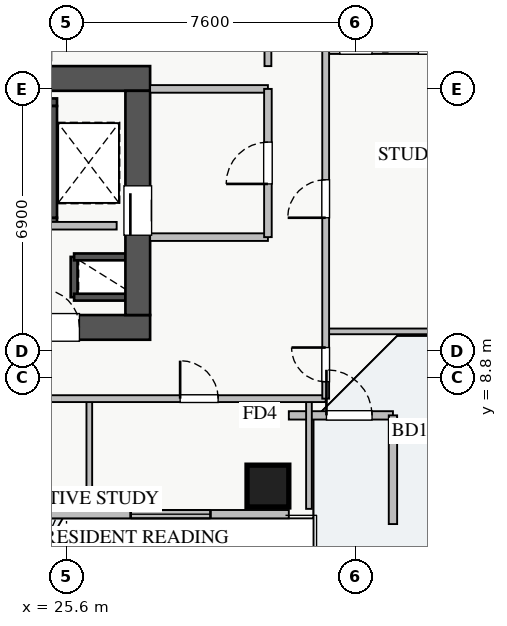
"""IFC4 building model, lengths in metres.
Left out: names, types, materials, properties, quantities, classifications, styles, units other than length and angle.
Written with IfcOpenShell. Run it as: python <this file> out.ifc"""

import sys

from ifc_helpers import new_model, si_unit, direction, frame, frame_2d, origin, origin_2d, place, context, subcontext, project, spatial, rectangle, extrude, source, transform, mapped, element, fill, save


model = new_model("IFC4")
c1 = context("Model", 3, precision=1e-05, world=origin(), true_north=direction((0.0, 1.0)))
c2 = subcontext(c1, "Body", "Model", "MODEL_VIEW")
j1 = project(units=[si_unit("LENGTHUNIT", "METRE"), si_unit("PLANEANGLEUNIT", "RADIAN")], contexts=[c1])
p1 = place(None, origin())
s1 = spatial("IfcSite", under=j1, at=p1, CompositionType="ELEMENT")
p2 = place(p1, origin())
s2 = spatial("IfcBuilding", under=s1, at=p2, CompositionType="ELEMENT")
p3 = place(p2, frame((0.0, 0.0, 113.25)))
s3 = spatial("IfcBuildingStorey", under=s2, at=p3, CompositionType="ELEMENT", Elevation=113.25)
p4 = place(p3, frame((25.8, 10.92, 0.0), z_axis=(0.0, 0.0, 1.0), x_axis=(0.0, 1.0, 0.0)))
e1 = element("IfcWall", 1, at=p4, inside=s3, PredefinedType="SHEAR", context=c2, shape_type="SweptSolid", body=[
    extrude(rectangle(XDim=1.06, YDim=0.18, at=frame_2d((0.53, 0.0))), origin(), (0.0, 0.0, 1.0), 3.07),
])
for number, where, z_axis, x_axis in (
    (2, (25.8, 11.98, 0.0), (0.0, 0.0, 1.0), (1.0, 0.0, 0.0)),
    (3, (25.8, 10.92, 0.0), (0.0, 0.0, 1.0), (1.0, 0.0, 0.0)),
):
    element("IfcWall", number, at=place(p3, frame(where, z_axis=z_axis, x_axis=x_axis)), inside=s3, PredefinedType="SHEAR", context=c2, shape_type="SweptSolid", body=[
        extrude(rectangle(XDim=1.35, YDim=0.18, at=frame_2d((0.675, 0.0))), origin(), (0.0, 0.0, 1.0), 3.07),
    ])
p5 = place(p3, frame((18.2, 12.91, 0.0), z_axis=(0.0, 0.0, 1.0), x_axis=(1.0, 0.0, 0.0)))
e4 = element("IfcWall", 4, at=p5, inside=s3, PredefinedType="SHEAR", context=c2, shape_type="SweptSolid", body=[
    extrude(rectangle(XDim=7.15, YDim=0.2, at=frame_2d((3.575, 0.0))), origin(), (0.0, 0.0, 1.0), 3.25),
])
p6 = place(p5, frame((0.35, 0.0, 0.0)))
e5 = element("IfcOpeningElement", 5, at=p6, cuts=e4, PredefinedType="OPENING", context=c2, shape_type="SweptSolid", body=[
    extrude(rectangle(XDim=1.1, YDim=2.05, at=frame_2d((0.55, 1.025))), frame((0.0, 0.11, 0.0), z_axis=(0.0, -1.0, 0.0), x_axis=(1.0, 0.0, 0.0)), (0.0, 0.0, 1.0), 0.22),
])
p7 = place(p3, frame((18.2, 16.05, 0.0), z_axis=(0.0, 0.0, 1.0), x_axis=(1.0, 0.0, 0.0)))
e6 = element("IfcWall", 6, at=p7, inside=s3, PredefinedType="SHEAR", context=c2, shape_type="SweptSolid", body=[
    extrude(rectangle(XDim=7.15, YDim=0.2, at=frame_2d((3.575, 0.0))), origin(), (0.0, 0.0, 1.0), 3.25),
])
p8 = place(p3, frame((25.25, 13.01, 0.0), z_axis=(0.0, 0.0, 1.0), x_axis=(0.0, 1.0, 0.0)))
e7 = element("IfcWall", 7, at=p8, inside=s3, PredefinedType="SHEAR", context=c2, shape_type="SweptSolid", body=[
    extrude(rectangle(XDim=2.94, YDim=0.2, at=frame_2d((1.47, 0.0))), origin(), (0.0, 0.0, 1.0), 3.25),
])
p9 = place(p3, frame((10.2, 10.125, 0.0), z_axis=(0.0, 0.0, 1.0), x_axis=(1.0, 0.0, 0.0)))
e8 = element("IfcWall", 8, at=p9, inside=s3, PredefinedType="SHEAR", context=c2, shape_type="SweptSolid", body=[
    extrude(rectangle(XDim=17.6, YDim=0.65, at=frame_2d((8.8, 0.0))), origin(), (0.0, 0.0, 1.0), 3.25),
])
p10 = place(p9, frame((1.15, 0.0, 0.0)))
e9 = element("IfcOpeningElement", 9, at=p10, cuts=e8, PredefinedType="OPENING", context=c2, shape_type="SweptSolid", body=[
    extrude(rectangle(XDim=1.1, YDim=2.05, at=frame_2d((0.55, 1.025))), frame((0.0, 0.335, 0.0), z_axis=(0.0, -1.0, 0.0), x_axis=(1.0, 0.0, 0.0)), (0.0, 0.0, 1.0), 0.67),
])
p11 = place(p9, frame((8.3, 0.0, 0.0)))
e10 = element("IfcOpeningElement", 10, at=p11, cuts=e8, PredefinedType="OPENING", context=c2, shape_type="SweptSolid", body=[
    extrude(rectangle(XDim=1.1, YDim=2.05, at=frame_2d((0.55, 1.025))), frame((0.0, 0.335, 0.0), z_axis=(0.0, -1.0, 0.0), x_axis=(1.0, 0.0, 0.0)), (0.0, 0.0, 1.0), 0.67),
])
p12 = place(p9, frame((4.9, 0.0, 0.0)))
e11 = element("IfcOpeningElement", 11, at=p12, cuts=e8, PredefinedType="OPENING", context=c2, shape_type="SweptSolid", body=[
    extrude(rectangle(XDim=1.1, YDim=2.05, at=frame_2d((0.55, 1.025))), frame((0.0, 0.335, 0.0), z_axis=(0.0, -1.0, 0.0), x_axis=(1.0, 0.0, 0.0)), (0.0, 0.0, 1.0), 0.67),
])
p13 = place(p9, frame((14.74, 0.0, 0.0)))
e12 = element("IfcOpeningElement", 12, at=p13, cuts=e8, PredefinedType="OPENING", context=c2, shape_type="SweptSolid", body=[
    extrude(rectangle(XDim=1.0, YDim=2.05, at=frame_2d((0.5, 1.025))), frame((0.0, 0.335, 0.0), z_axis=(0.0, -1.0, 0.0), x_axis=(1.0, 0.0, 0.0)), (0.0, 0.0, 1.0), 0.67),
])
p14 = place(p9, frame((10.155, 0.0, 0.0)))
e13 = element("IfcOpeningElement", 13, at=p14, cuts=e8, PredefinedType="OPENING", context=c2, shape_type="SweptSolid", body=[
    extrude(rectangle(XDim=1.0, YDim=2.05, at=frame_2d((0.5, 1.025))), frame((0.0, 0.335, 0.0), z_axis=(0.0, -1.0, 0.0), x_axis=(1.0, 0.0, 0.0)), (0.0, 0.0, 1.0), 0.67),
])
p15 = place(p9, frame((11.87, 0.0, 0.0)))
e14 = element("IfcOpeningElement", 14, at=p15, cuts=e8, PredefinedType="OPENING", context=c2, shape_type="SweptSolid", body=[
    extrude(rectangle(XDim=1.0, YDim=2.05, at=frame_2d((0.5, 1.025))), frame((0.0, 0.335, 0.0), z_axis=(0.0, -1.0, 0.0), x_axis=(1.0, 0.0, 0.0)), (0.0, 0.0, 1.0), 0.67),
])
p16 = place(p9, frame((13.46, 0.0, 0.0)))
e15 = element("IfcOpeningElement", 15, at=p16, cuts=e8, PredefinedType="OPENING", context=c2, shape_type="SweptSolid", body=[
    extrude(rectangle(XDim=1.0, YDim=2.05, at=frame_2d((0.5, 1.025))), frame((0.0, 0.335, 0.0), z_axis=(0.0, -1.0, 0.0), x_axis=(1.0, 0.0, 0.0)), (0.0, 0.0, 1.0), 0.67),
])
p17 = place(p3, frame((10.2, 16.675, 0.0), z_axis=(0.0, 0.0, 1.0), x_axis=(1.0, 0.0, 0.0)))
e16 = element("IfcWall", 16, at=p17, inside=s3, PredefinedType="SHEAR", context=c2, shape_type="SweptSolid", body=[
    extrude(rectangle(XDim=17.6, YDim=0.65, at=frame_2d((8.8, 0.0))), origin(), (0.0, 0.0, 1.0), 3.25),
])
p18 = place(p3, frame((27.475, 10.45, 0.0), z_axis=(0.0, 0.0, 1.0), x_axis=(0.0, 1.0, 0.0)))
e17 = element("IfcWall", 17, at=p18, inside=s3, PredefinedType="SHEAR", context=c2, shape_type="SweptSolid", body=[
    extrude(rectangle(XDim=5.9, YDim=0.65, at=frame_2d((2.95, 0.0))), origin(), (0.0, 0.0, 1.0), 3.25),
])
p19 = place(p18, frame((2.1, 0.0, 0.0)))
e18 = element("IfcOpeningElement", 18, at=p19, cuts=e17, PredefinedType="OPENING", context=c2, shape_type="SweptSolid", body=[
    extrude(rectangle(XDim=1.3, YDim=2.05, at=frame_2d((0.65, 1.025))), frame((0.0, 0.335, 0.0), z_axis=(0.0, -1.0, 0.0), x_axis=(1.0, 0.0, 0.0)), (0.0, 0.0, 1.0), 0.67),
])
m1 = source(origin(), c2, "Body", "SweptSolid", [
    extrude(rectangle(XDim=1.1, YDim=1.1, at=origin_2d()), origin(), (0.0, 0.0, 1.0), 3.25),
])
p20 = place(p3, frame((30.9, 5.95, 0.0), z_axis=(0.0, 0.0, 1.0), x_axis=(1.0, 0.0, 0.0)))
e19 = element("IfcColumn", 19, at=p20, inside=s3, PredefinedType="COLUMN", context=c2, shape_type="MappedRepresentation", body=[
    mapped(m1, transform((0.0, 0.0, 0.0), x_axis=(1.0, 0.0, 0.0), y_axis=(0.0, 1.0, 0.0), z_axis=(0.0, 0.0, 1.0), scale=1.0)),
])
p21 = place(p3, frame((6.55, 5.21, 0.0), z_axis=(0.0, 0.0, 1.0), x_axis=(1.0, 0.0, 0.0)))
e20 = element("IfcWall", 20, at=p21, inside=s3, PredefinedType="STANDARD", context=c2, shape_type="SweptSolid", body=[
    extrude(rectangle(XDim=24.9, YDim=0.22, at=frame_2d((12.45, 0.0))), origin(), (0.0, 0.0, 1.0), 2.61),
])
p22 = place(p21, frame((13.3, 0.0, 0.0)))
e21 = element("IfcOpeningElement", 21, at=p22, cuts=e20, PredefinedType="OPENING", context=c2, shape_type="SweptSolid", body=[
    extrude(rectangle(XDim=1.2, YDim=2.1, at=frame_2d((0.6, 1.05))), frame((0.0, 0.12, 0.0), z_axis=(0.0, -1.0, 0.0), x_axis=(1.0, 0.0, 0.0)), (0.0, 0.0, 1.0), 0.24),
])
p23 = place(p21, frame((0.258, 0.0, 0.9)))
e22 = element("IfcOpeningElement", 22, at=p23, cuts=e20, PredefinedType="OPENING", context=c2, shape_type="SweptSolid", body=[
    extrude(rectangle(XDim=1.8, YDim=1.5, at=frame_2d((0.9, 0.75))), frame((0.0, 0.12, 0.0), z_axis=(0.0, -1.0, 0.0), x_axis=(1.0, 0.0, 0.0)), (0.0, 0.0, 1.0), 0.24),
])
p24 = place(p21, frame((9.775, 0.0, 0.9)))
e23 = element("IfcOpeningElement", 23, at=p24, cuts=e20, PredefinedType="OPENING", context=c2, shape_type="SweptSolid", body=[
    extrude(rectangle(XDim=1.8, YDim=1.5, at=frame_2d((0.9, 0.75))), frame((0.0, 0.12, 0.0), z_axis=(0.0, -1.0, 0.0), x_axis=(1.0, 0.0, 0.0)), (0.0, 0.0, 1.0), 0.24),
])
p25 = place(p21, frame((14.813, 0.0, 0.9)))
e24 = element("IfcOpeningElement", 24, at=p25, cuts=e20, PredefinedType="OPENING", context=c2, shape_type="SweptSolid", body=[
    extrude(rectangle(XDim=1.5, YDim=1.45, at=frame_2d((0.75, 0.725))), frame((0.0, 0.12, 0.0), z_axis=(0.0, -1.0, 0.0), x_axis=(1.0, 0.0, 0.0)), (0.0, 0.0, 1.0), 0.24),
])
p26 = place(p21, frame((20.738, 0.0, 0.9)))
e25 = element("IfcOpeningElement", 25, at=p26, cuts=e20, PredefinedType="OPENING", context=c2, shape_type="SweptSolid", body=[
    extrude(rectangle(XDim=2.1, YDim=1.48, at=frame_2d((1.05, 0.74))), frame((0.0, 0.12, 0.0), z_axis=(0.0, -1.0, 0.0), x_axis=(1.0, 0.0, 0.0)), (0.0, 0.0, 1.0), 0.24),
])
p27 = place(p21, frame((4.187, 0.0, 0.9)))
e26 = element("IfcOpeningElement", 26, at=p27, cuts=e20, PredefinedType="OPENING", context=c2, shape_type="SweptSolid", body=[
    extrude(rectangle(XDim=2.4, YDim=1.5, at=frame_2d((1.2, 0.75))), frame((0.0, 0.12, 0.0), z_axis=(0.0, -1.0, 0.0), x_axis=(1.0, 0.0, 0.0)), (0.0, 0.0, 1.0), 0.24),
])
p28 = place(p3, frame((31.45, 7.81, 0.0), z_axis=(0.0, 0.0, 1.0), x_axis=(1.0, 0.0, 0.0)))
e27 = element("IfcWall", 27, at=p28, inside=s3, PredefinedType="STANDARD", context=c2, shape_type="SweptSolid", body=[
    extrude(rectangle(XDim=2.74, YDim=0.22, at=frame_2d((1.37, 0.0))), origin(), (0.0, 0.0, 1.0), 2.61),
])
p29 = place(p28, frame((0.99, 0.0, 0.0)))
e28 = element("IfcOpeningElement", 28, at=p29, cuts=e27, PredefinedType="OPENING", context=c2, shape_type="SweptSolid", body=[
    extrude(rectangle(XDim=1.2, YDim=2.1, at=frame_2d((0.6, 1.05))), frame((0.0, 0.12, 0.0), z_axis=(0.0, -1.0, 0.0), x_axis=(1.0, 0.0, 0.0)), (0.0, 0.0, 1.0), 0.24),
])
p30 = place(p3, frame((34.19, 4.95, 0.0), z_axis=(0.0, 0.0, 1.0), x_axis=(0.0, 1.0, 0.0)))
e29 = element("IfcWall", 29, at=p30, inside=s3, PredefinedType="STANDARD", context=c2, shape_type="SweptSolid", body=[
    extrude(rectangle(XDim=2.86, YDim=0.22, at=frame_2d((1.43, 0.0))), origin(), (0.0, 0.0, 1.0), 2.61),
])
for number, where, z_axis, x_axis in (
    (30, (27.8, 16.4, 0.0), (0.0, 0.0, 1.0), (1.0, 0.0, 0.0)),
    (31, (27.8, 12.5, 0.0), (0.0, 0.0, 1.0), (1.0, 0.0, 0.0)),
):
    element("IfcWall", number, at=place(p3, frame(where, z_axis=z_axis, x_axis=x_axis)), inside=s3, PredefinedType="PARTITIONING", context=c2, shape_type="SweptSolid", body=[
        extrude(rectangle(XDim=3.1, YDim=0.2, at=frame_2d((1.55, 0.0))), origin(), (0.0, 0.0, 1.0), 3.07),
    ])
p31 = place(p3, frame((30.9, 12.5, 0.0), z_axis=(0.0, 0.0, 1.0), x_axis=(0.0, 1.0, 0.0)))
e32 = element("IfcWall", 32, at=p31, inside=s3, PredefinedType="PARTITIONING", context=c2, shape_type="SweptSolid", body=[
    extrude(rectangle(XDim=3.9, YDim=0.2, at=frame_2d((1.95, 0.0))), origin(), (0.0, 0.0, 1.0), 3.07),
])
p32 = place(p31, frame((1.4, 0.0, 0.0)))
e33 = element("IfcOpeningElement", 33, at=p32, cuts=e32, PredefinedType="OPENING", context=c2, shape_type="SweptSolid", body=[
    extrude(rectangle(XDim=1.1, YDim=2.05, at=frame_2d((0.55, 1.025))), frame((0.0, 0.11, 0.0), z_axis=(0.0, -1.0, 0.0), x_axis=(1.0, 0.0, 0.0)), (0.0, 0.0, 1.0), 0.22),
])
p33 = place(p3, frame((21.75, 12.8, 0.0), z_axis=(0.0, 0.0, 1.0), x_axis=(1.0, 0.0, 0.0)))
e34 = element("IfcWall", 34, at=p33, inside=s3, PredefinedType="PARTITIONING", context=c2, shape_type="SweptSolid", body=[
    extrude(rectangle(XDim=5.17, YDim=0.2, at=frame_2d((2.585, 0.0))), origin(), (0.0, 0.0, 1.0), 3.07),
])
for number, where, z_axis, x_axis in (
    (35, (26.2, 5.35, 0.0), (0.0, 0.0, 1.0), (0.0, 1.0, 0.0)),
    (36, (31.98, 5.35, 0.0), (0.0, 0.0, 1.0), (0.0, 1.0, 0.0)),
):
    element("IfcWall", number, at=place(p3, frame(where, z_axis=z_axis, x_axis=x_axis)), inside=s3, PredefinedType="PARTITIONING", context=c2, shape_type="SweptSolid", body=[
        extrude(rectangle(XDim=2.9, YDim=0.15, at=frame_2d((1.45, 0.0))), origin(), (0.0, 0.0, 1.0), 3.07),
    ])
p34 = place(p3, frame((8.85, 8.25, 0.0), z_axis=(0.0, 0.0, 1.0), x_axis=(1.0, 0.0, 0.0)))
e37 = element("IfcWall", 37, at=p34, inside=s3, PredefinedType="PARTITIONING", context=c2, shape_type="SweptSolid", body=[
    extrude(rectangle(XDim=23.57, YDim=0.18, at=frame_2d((11.785, 0.0))), origin(), (0.0, 0.0, 1.0), 3.07),
])
p35 = place(p34, frame((2.75, 0.0, 0.0)))
e38 = element("IfcOpeningElement", 38, at=p35, cuts=e37, PredefinedType="OPENING", context=c2, shape_type="SweptSolid", body=[
    extrude(rectangle(XDim=1.0, YDim=2.05, at=frame_2d((0.5, 1.025))), frame((0.0, 0.1, 0.0), z_axis=(0.0, -1.0, 0.0), x_axis=(1.0, 0.0, 0.0)), (0.0, 0.0, 1.0), 0.2),
])
p36 = place(p34, frame((7.875, 0.0, 0.0)))
e39 = element("IfcOpeningElement", 39, at=p36, cuts=e37, PredefinedType="OPENING", context=c2, shape_type="SweptSolid", body=[
    extrude(rectangle(XDim=1.0, YDim=2.05, at=frame_2d((0.5, 1.025))), frame((0.0, 0.1, 0.0), z_axis=(0.0, -1.0, 0.0), x_axis=(1.0, 0.0, 0.0)), (0.0, 0.0, 1.0), 0.2),
])
p37 = place(p34, frame((13.3, 0.0, 0.0)))
e40 = element("IfcOpeningElement", 40, at=p37, cuts=e37, PredefinedType="OPENING", context=c2, shape_type="SweptSolid", body=[
    extrude(rectangle(XDim=1.0, YDim=2.05, at=frame_2d((0.5, 1.025))), frame((0.0, 0.1, 0.0), z_axis=(0.0, -1.0, 0.0), x_axis=(1.0, 0.0, 0.0)), (0.0, 0.0, 1.0), 0.2),
])
p38 = place(p34, frame((19.74, 0.0, 0.0)))
e41 = element("IfcOpeningElement", 41, at=p38, cuts=e37, PredefinedType="OPENING", context=c2, shape_type="SweptSolid", body=[
    extrude(rectangle(XDim=1.0, YDim=2.05, at=frame_2d((0.5, 1.025))), frame((0.0, 0.1, 0.0), z_axis=(0.0, -1.0, 0.0), x_axis=(1.0, 0.0, 0.0)), (0.0, 0.0, 1.0), 0.2),
])
p39 = place(p3, frame((32.42, 10.02, 0.0), z_axis=(0.0, 0.0, 1.0), x_axis=(1.0, 0.0, 0.0)))
e42 = element("IfcWall", 42, at=p39, inside=s3, PredefinedType="PARTITIONING", context=c2, shape_type="SweptSolid", body=[
    extrude(rectangle(XDim=4.23, YDim=0.15, at=frame_2d((2.115, 0.0))), origin(), (0.0, 0.0, 1.0), 3.07),
])
p40 = place(p3, frame((32.42, 17.38, 0.0), z_axis=(0.0, 0.0, 1.0), x_axis=(1.0, 0.0, 0.0)))
e43 = element("IfcWall", 43, at=p40, inside=s3, PredefinedType="PLUMBINGWALL", context=c2, shape_type="SweptSolid", body=[
    extrude(rectangle(XDim=4.23, YDim=0.12, at=frame_2d((2.115, 0.0))), origin(), (0.0, 0.0, 1.0), 3.07),
])
p41 = place(p40, frame((0.37, 0.0, 0.0)))
e44 = element("IfcOpeningElement", 44, at=p41, cuts=e43, PredefinedType="OPENING", context=c2, shape_type="SweptSolid", body=[
    extrude(rectangle(XDim=0.85, YDim=2.05, at=frame_2d((0.425, 1.025))), frame((0.0, 0.07, 0.0), z_axis=(0.0, -1.0, 0.0), x_axis=(1.0, 0.0, 0.0)), (0.0, 0.0, 1.0), 0.14),
])
p42 = place(p40, frame((2.44, 0.0, 0.0)))
e45 = element("IfcOpeningElement", 45, at=p42, cuts=e43, PredefinedType="OPENING", context=c2, shape_type="SweptSolid", body=[
    extrude(rectangle(XDim=0.9, YDim=2.05, at=frame_2d((0.45, 1.025))), frame((0.0, 0.07, 0.0), z_axis=(0.0, -1.0, 0.0), x_axis=(1.0, 0.0, 0.0)), (0.0, 0.0, 1.0), 0.14),
])
p43 = place(p3, frame((32.42, 8.25, 0.0), z_axis=(0.0, 0.0, 1.0), x_axis=(0.0, 1.0, 0.0)))
e46 = element("IfcWall", 46, at=p43, inside=s3, PredefinedType="PARTITIONING", context=c2, shape_type="SweptSolid", body=[
    extrude(rectangle(XDim=29.5, YDim=0.18, at=frame_2d((14.75, 0.0))), origin(), (0.0, 0.0, 1.0), 3.07),
])
p44 = place(p43, frame((28.155, 0.0, 0.0)))
e47 = element("IfcOpeningElement", 47, at=p44, cuts=e46, PredefinedType="OPENING", context=c2, shape_type="SweptSolid", body=[
    extrude(rectangle(XDim=0.9, YDim=2.05, at=frame_2d((0.45, 1.025))), frame((0.0, 0.1, 0.0), z_axis=(0.0, -1.0, 0.0), x_axis=(1.0, 0.0, 0.0)), (0.0, 0.0, 1.0), 0.2),
])
p45 = place(p43, frame((0.445, 0.0, 0.0)))
e48 = element("IfcOpeningElement", 48, at=p45, cuts=e46, PredefinedType="OPENING", context=c2, shape_type="SweptSolid", body=[
    extrude(rectangle(XDim=0.9, YDim=2.05, at=frame_2d((0.45, 1.025))), frame((0.0, 0.1, 0.0), z_axis=(0.0, -1.0, 0.0), x_axis=(1.0, 0.0, 0.0)), (0.0, 0.0, 1.0), 0.2),
])
p46 = place(p43, frame((4.76, 0.0, 0.0)))
e49 = element("IfcOpeningElement", 49, at=p46, cuts=e46, PredefinedType="OPENING", context=c2, shape_type="SweptSolid", body=[
    extrude(rectangle(XDim=1.0, YDim=2.05, at=frame_2d((0.5, 1.025))), frame((0.0, 0.1, 0.0), z_axis=(0.0, -1.0, 0.0), x_axis=(1.0, 0.0, 0.0)), (0.0, 0.0, 1.0), 0.2),
])
p47 = place(p43, frame((18.04, 0.0, 0.0)))
e50 = element("IfcOpeningElement", 50, at=p47, cuts=e46, PredefinedType="OPENING", context=c2, shape_type="SweptSolid", body=[
    extrude(rectangle(XDim=1.0, YDim=2.05, at=frame_2d((0.5, 1.025))), frame((0.0, 0.1, 0.0), z_axis=(0.0, -1.0, 0.0), x_axis=(1.0, 0.0, 0.0)), (0.0, 0.0, 1.0), 0.2),
])
p48 = place(p3, frame((30.9, 17.0, 0.0), z_axis=(0.0, 0.0, 1.0), x_axis=(0.0, 1.0, 0.0)))
e51 = element("IfcWall", 51, at=p48, inside=s3, PredefinedType="PARTITIONING", context=c2, shape_type="SweptSolid", body=[
    extrude(rectangle(XDim=12.0, YDim=0.18, at=frame_2d((6.0, 0.0))), origin(), (0.0, 0.0, 1.0), 3.07),
])
p49 = place(p48, frame((0.855, 0.0, 0.0)))
e52 = element("IfcOpeningElement", 52, at=p49, cuts=e51, PredefinedType="OPENING", context=c2, shape_type="SweptSolid", body=[
    extrude(rectangle(XDim=1.0, YDim=2.05, at=frame_2d((0.5, 1.025))), frame((0.0, 0.1, 0.0), z_axis=(0.0, -1.0, 0.0), x_axis=(1.0, 0.0, 0.0)), (0.0, 0.0, 1.0), 0.2),
])
p50 = place(p48, frame((6.725, 0.0, 0.0)))
e53 = element("IfcOpeningElement", 53, at=p50, cuts=e51, PredefinedType="OPENING", context=c2, shape_type="SweptSolid", body=[
    extrude(rectangle(XDim=1.0, YDim=2.05, at=frame_2d((0.5, 1.025))), frame((0.0, 0.1, 0.0), z_axis=(0.0, -1.0, 0.0), x_axis=(1.0, 0.0, 0.0)), (0.0, 0.0, 1.0), 0.2),
])
m2 = source(origin(), c2, "Body", "SweptSolid", [
    extrude(rectangle(XDim=2.1, YDim=1.48, at=frame_2d((1.05, 0.74))), frame((0.0, 0.03, 0.0), z_axis=(0.0, -1.0, 0.0), x_axis=(1.0, 0.0, 0.0)), (0.0, 0.0, 1.0), 0.06),
])
p51 = place(p26, origin())
e54 = element("IfcWindow", 54, at=p51, inside=s3, PartitioningType="TRIPLE_PANEL_VERTICAL", PredefinedType="WINDOW", context=c2, shape_type="MappedRepresentation", body=[
    mapped(m2, transform((0.0, 0.0, 0.0), x_axis=(1.0, 0.0, 0.0), y_axis=(0.0, 1.0, 0.0), z_axis=(0.0, 0.0, 1.0), scale=1.0)),
])
fill(e25, e54)
m3 = source(origin(), c2, "Body", "SweptSolid", [
    extrude(rectangle(XDim=1.2, YDim=2.1, at=frame_2d((0.6, 1.05))), frame((0.0, 0.025, 0.0), z_axis=(0.0, -1.0, 0.0), x_axis=(1.0, 0.0, 0.0)), (0.0, 0.0, 1.0), 0.05),
])
p52 = place(p29, origin())
e55 = element("IfcDoor", 55, at=p52, inside=s3, OperationType="SINGLE_SWING_LEFT", PredefinedType="DOOR", context=c2, shape_type="MappedRepresentation", body=[
    mapped(m3, transform((0.0, 0.0, 0.0), x_axis=(1.0, 0.0, 0.0), y_axis=(0.0, 1.0, 0.0), z_axis=(0.0, 0.0, 1.0), scale=1.0)),
])
fill(e28, e55)
m4 = source(origin(), c2, "Body", "SweptSolid", [
    extrude(rectangle(XDim=1.3, YDim=2.05, at=frame_2d((0.65, 1.025))), frame((0.0, 0.025, 0.0), z_axis=(0.0, -1.0, 0.0), x_axis=(1.0, 0.0, 0.0)), (0.0, 0.0, 1.0), 0.05),
])
p53 = place(p19, origin())
e56 = element("IfcDoor", 56, at=p53, inside=s3, OperationType="SLIDING_TO_RIGHT", PredefinedType="DOOR", context=c2, shape_type="MappedRepresentation", body=[
    mapped(m4, transform((0.0, 0.0, 0.0), x_axis=(1.0, 0.0, 0.0), y_axis=(0.0, 1.0, 0.0), z_axis=(0.0, 0.0, 1.0), scale=1.0)),
])
fill(e18, e56)
m5 = source(origin(), c2, "Body", "SweptSolid", [
    extrude(rectangle(XDim=1.0, YDim=2.05, at=frame_2d((0.5, 1.025))), frame((0.0, 0.025, 0.0), z_axis=(0.0, -1.0, 0.0), x_axis=(1.0, 0.0, 0.0)), (0.0, 0.0, 1.0), 0.05),
])
p54 = place(p13, origin())
e57 = element("IfcDoor", 57, at=p54, inside=s3, OperationType="SINGLE_SWING_LEFT", PredefinedType="DOOR", context=c2, shape_type="MappedRepresentation", body=[
    mapped(m5, transform((0.0, 0.0, 0.0), x_axis=(1.0, 0.0, 0.0), y_axis=(0.0, 1.0, 0.0), z_axis=(0.0, 0.0, 1.0), scale=1.0)),
])
fill(e12, e57)
m6 = source(origin(), c2, "Body", "SweptSolid", [
    extrude(rectangle(XDim=1.1, YDim=2.05, at=frame_2d((0.55, 1.025))), frame((0.0, 0.025, 0.0), z_axis=(0.0, -1.0, 0.0), x_axis=(1.0, 0.0, 0.0)), (0.0, 0.0, 1.0), 0.05),
])
p55 = place(p32, origin())
e58 = element("IfcDoor", 58, at=p55, inside=s3, OperationType="SINGLE_SWING_LEFT", PredefinedType="DOOR", context=c2, shape_type="MappedRepresentation", body=[
    mapped(m6, transform((0.0, 0.0, 0.0), x_axis=(1.0, 0.0, 0.0), y_axis=(0.0, 1.0, 0.0), z_axis=(0.0, 0.0, 1.0), scale=1.0)),
])
fill(e33, e58)
p56 = place(p38, origin())
e59 = element("IfcDoor", 59, at=p56, inside=s3, OperationType="SINGLE_SWING_LEFT", PredefinedType="DOOR", context=c2, shape_type="MappedRepresentation", body=[
    mapped(m5, transform((0.0, 0.0, 0.0), x_axis=(1.0, 0.0, 0.0), y_axis=(0.0, 1.0, 0.0), z_axis=(0.0, 0.0, 1.0), scale=1.0)),
])
fill(e41, e59)
m7 = source(origin(), c2, "Body", "SweptSolid", [
    extrude(rectangle(XDim=0.85, YDim=2.05, at=frame_2d((0.425, 1.025))), frame((0.0, 0.025, 0.0), z_axis=(0.0, -1.0, 0.0), x_axis=(1.0, 0.0, 0.0)), (0.0, 0.0, 1.0), 0.05),
])
p57 = place(p41, origin())
e60 = element("IfcDoor", 60, at=p57, inside=s3, OperationType="SINGLE_SWING_LEFT", PredefinedType="DOOR", context=c2, shape_type="MappedRepresentation", body=[
    mapped(m7, transform((0.0, 0.0, 0.0), x_axis=(1.0, 0.0, 0.0), y_axis=(0.0, 1.0, 0.0), z_axis=(0.0, 0.0, 1.0), scale=1.0)),
])
fill(e44, e60)
m8 = source(origin(), c2, "Body", "SweptSolid", [
    extrude(rectangle(XDim=0.9, YDim=2.05, at=frame_2d((0.45, 1.025))), frame((0.0, 0.025, 0.0), z_axis=(0.0, -1.0, 0.0), x_axis=(1.0, 0.0, 0.0)), (0.0, 0.0, 1.0), 0.05),
])
p58 = place(p42, origin())
e61 = element("IfcDoor", 61, at=p58, inside=s3, OperationType="SINGLE_SWING_RIGHT", PredefinedType="DOOR", context=c2, shape_type="MappedRepresentation", body=[
    mapped(m8, transform((0.0, 0.0, 0.0), x_axis=(1.0, 0.0, 0.0), y_axis=(0.0, 1.0, 0.0), z_axis=(0.0, 0.0, 1.0), scale=1.0)),
])
fill(e45, e61)
p59 = place(p45, origin())
e62 = element("IfcDoor", 62, at=p59, inside=s3, OperationType="SINGLE_SWING_RIGHT", PredefinedType="DOOR", context=c2, shape_type="MappedRepresentation", body=[
    mapped(m8, transform((0.0, 0.0, 0.0), x_axis=(1.0, 0.0, 0.0), y_axis=(0.0, 1.0, 0.0), z_axis=(0.0, 0.0, 1.0), scale=1.0)),
])
fill(e48, e62)
p60 = place(p46, origin())
e63 = element("IfcDoor", 63, at=p60, inside=s3, OperationType="SINGLE_SWING_LEFT", PredefinedType="DOOR", context=c2, shape_type="MappedRepresentation", body=[
    mapped(m5, transform((0.0, 0.0, 0.0), x_axis=(1.0, 0.0, 0.0), y_axis=(0.0, 1.0, 0.0), z_axis=(0.0, 0.0, 1.0), scale=1.0)),
])
fill(e49, e63)
save(model, sys.argv[1])
